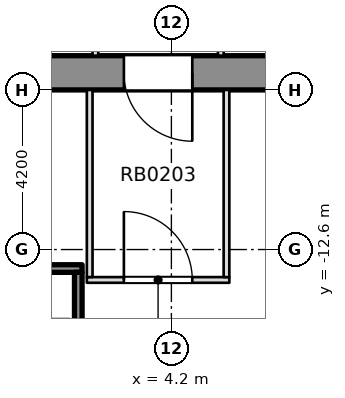
"""IFC4 building model, lengths in metres.
Left out: names, types, materials, properties, quantities, classifications, styles, units other than length and angle.
Written with IfcOpenShell. Run it as: python <this file> out.ifc"""

import sys

from ifc_helpers import new_model, si_unit, direction, frame, frame_2d, origin, place, context, subcontext, project, spatial, rectangle, extrude, element, fill, save


model = new_model("IFC4")
c1 = context("Model", 3, precision=1e-05, world=origin(), true_north=direction((0.0, 1.0)))
c2 = subcontext(c1, "Body", "Model", "MODEL_VIEW")
j1 = project(units=[si_unit("LENGTHUNIT", "METRE"), si_unit("PLANEANGLEUNIT", "RADIAN")], contexts=[c1])
p1 = place(None, origin())
s1 = spatial("IfcSite", under=j1, at=p1, CompositionType="ELEMENT")
p2 = place(p1, origin())
s2 = spatial("IfcBuilding", under=s1, at=p2, CompositionType="ELEMENT")
p3 = place(p2, frame((0.0, 0.0, -8.4)))
s3 = spatial("IfcBuildingStorey", under=s2, at=p3, CompositionType="ELEMENT", Elevation=-8.4)
p4 = place(p3, frame((-11.7, -7.95, 0.0), z_axis=(0.0, 0.0, 1.0), x_axis=(1.0, 0.0, 0.0)))
e1 = element("IfcWall", 1, at=p4, inside=s3, PredefinedType="SHEAR", context=c2, shape_type="SweptSolid", body=[
    extrude(rectangle(XDim=23.4, YDim=0.9, at=frame_2d((11.7, 0.0))), origin(), (0.0, 0.0, 1.0), 3.85),
])
p5 = place(p4, frame((6.95, 0.0, 0.0)))
e2 = element("IfcOpeningElement", 2, at=p5, cuts=e1, PredefinedType="OPENING", context=c2, shape_type="SweptSolid", body=[
    extrude(rectangle(XDim=1.8, YDim=2.1, at=frame_2d((0.9, 1.05))), frame((0.0, 0.46, 0.0), z_axis=(0.0, -1.0, 0.0), x_axis=(1.0, 0.0, 0.0)), (0.0, 0.0, 1.0), 0.92),
])
p6 = place(p4, frame((14.65, 0.0, 0.0)))
e3 = element("IfcOpeningElement", 3, at=p6, cuts=e1, PredefinedType="OPENING", context=c2, shape_type="SweptSolid", body=[
    extrude(rectangle(XDim=1.8, YDim=2.1, at=frame_2d((0.9, 1.05))), frame((0.0, 0.46, 0.0), z_axis=(0.0, -1.0, 0.0), x_axis=(1.0, 0.0, 0.0)), (0.0, 0.0, 1.0), 0.92),
])
p7 = place(p3, frame((1.975, -13.4, 0.0), z_axis=(0.0, 0.0, 1.0), x_axis=(1.0, 0.0, 0.0)))
e4 = element("IfcWall", 4, at=p7, inside=s3, PredefinedType="PARTITIONING", context=c2, shape_type="SweptSolid", body=[
    extrude(rectangle(XDim=3.75, YDim=0.15, at=frame_2d((1.875, 0.0))), origin(), (0.0, 0.0, 1.0), 3.85),
])
p8 = place(p7, frame((0.975, 0.0, 0.0)))
e5 = element("IfcOpeningElement", 5, at=p8, cuts=e4, PredefinedType="OPENING", context=c2, shape_type="SweptSolid", body=[
    extrude(rectangle(XDim=1.8, YDim=2.1, at=frame_2d((0.9, 1.05))), frame((0.0, 0.085, 0.0), z_axis=(0.0, -1.0, 0.0), x_axis=(1.0, 0.0, 0.0)), (0.0, 0.0, 1.0), 0.17),
])
for number, where, z_axis, x_axis in (
    (6, (2.05, -13.325, 0.0), (0.0, 0.0, 1.0), (0.0, 1.0, 0.0)),
    (7, (5.65, -13.325, 0.0), (0.0, 0.0, 1.0), (0.0, 1.0, 0.0)),
):
    element("IfcWall", number, at=place(p3, frame(where, z_axis=z_axis, x_axis=x_axis)), inside=s3, PredefinedType="PARTITIONING", context=c2, shape_type="SweptSolid", body=[
        extrude(rectangle(XDim=4.924, YDim=0.15, at=frame_2d((2.462, 0.0))), origin(), (0.0, 0.0, 1.0), 3.85),
    ])
p9 = place(p3, frame((2.2, -7.499, 0.0), z_axis=(0.0, 0.0, 1.0), x_axis=(0.0, 1.0, 0.0)))
e8 = element("IfcWall", 8, at=p9, inside=s3, PredefinedType="PARTITIONING", context=c2, shape_type="SweptSolid", body=[
    extrude(rectangle(XDim=11.924, YDim=0.15, at=frame_2d((5.962, 0.0))), origin(), (0.0, 0.0, 1.0), 3.85),
])
p10 = place(p9, frame((0.949, 0.0, 0.0)))
e9 = element("IfcOpeningElement", 9, at=p10, cuts=e8, PredefinedType="OPENING", context=c2, shape_type="SweptSolid", body=[
    extrude(rectangle(XDim=1.1, YDim=2.1, at=frame_2d((0.55, 1.05))), frame((0.0, 0.085, 0.0), z_axis=(0.0, -1.0, 0.0), x_axis=(1.0, 0.0, 0.0)), (0.0, 0.0, 1.0), 0.17),
])
p11 = place(p9, frame((3.949, 0.0, 0.0)))
e10 = element("IfcOpeningElement", 10, at=p11, cuts=e8, PredefinedType="OPENING", context=c2, shape_type="SweptSolid", body=[
    extrude(rectangle(XDim=1.1, YDim=2.1, at=frame_2d((0.55, 1.05))), frame((0.0, 0.085, 0.0), z_axis=(0.0, -1.0, 0.0), x_axis=(1.0, 0.0, 0.0)), (0.0, 0.0, 1.0), 0.17),
])
p12 = place(p9, frame((6.949, 0.0, 0.0)))
e11 = element("IfcOpeningElement", 11, at=p12, cuts=e8, PredefinedType="OPENING", context=c2, shape_type="SweptSolid", body=[
    extrude(rectangle(XDim=1.1, YDim=2.1, at=frame_2d((0.55, 1.05))), frame((0.0, 0.085, 0.0), z_axis=(0.0, -1.0, 0.0), x_axis=(1.0, 0.0, 0.0)), (0.0, 0.0, 1.0), 0.17),
])
p13 = place(p9, frame((9.949, 0.0, 0.0)))
e12 = element("IfcOpeningElement", 12, at=p13, cuts=e8, PredefinedType="OPENING", context=c2, shape_type="SweptSolid", body=[
    extrude(rectangle(XDim=1.1, YDim=2.1, at=frame_2d((0.55, 1.05))), frame((0.0, 0.085, 0.0), z_axis=(0.0, -1.0, 0.0), x_axis=(1.0, 0.0, 0.0)), (0.0, 0.0, 1.0), 0.17),
])
p14 = place(p3, frame((5.5, -7.499, 0.0), z_axis=(0.0, 0.0, 1.0), x_axis=(0.0, 1.0, 0.0)))
e13 = element("IfcWall", 13, at=p14, inside=s3, PredefinedType="PARTITIONING", context=c2, shape_type="SweptSolid", body=[
    extrude(rectangle(XDim=11.924, YDim=0.15, at=frame_2d((5.962, 0.0))), origin(), (0.0, 0.0, 1.0), 3.85),
])
p15 = place(p14, frame((0.949, 0.0, 0.0)))
e14 = element("IfcOpeningElement", 14, at=p15, cuts=e13, PredefinedType="OPENING", context=c2, shape_type="SweptSolid", body=[
    extrude(rectangle(XDim=1.1, YDim=2.1, at=frame_2d((0.55, 1.05))), frame((0.0, 0.085, 0.0), z_axis=(0.0, -1.0, 0.0), x_axis=(1.0, 0.0, 0.0)), (0.0, 0.0, 1.0), 0.17),
])
p16 = place(p14, frame((3.949, 0.0, 0.0)))
e15 = element("IfcOpeningElement", 15, at=p16, cuts=e13, PredefinedType="OPENING", context=c2, shape_type="SweptSolid", body=[
    extrude(rectangle(XDim=1.1, YDim=2.1, at=frame_2d((0.55, 1.05))), frame((0.0, 0.085, 0.0), z_axis=(0.0, -1.0, 0.0), x_axis=(1.0, 0.0, 0.0)), (0.0, 0.0, 1.0), 0.17),
])
p17 = place(p14, frame((6.949, 0.0, 0.0)))
e16 = element("IfcOpeningElement", 16, at=p17, cuts=e13, PredefinedType="OPENING", context=c2, shape_type="SweptSolid", body=[
    extrude(rectangle(XDim=1.1, YDim=2.1, at=frame_2d((0.55, 1.05))), frame((0.0, 0.085, 0.0), z_axis=(0.0, -1.0, 0.0), x_axis=(1.0, 0.0, 0.0)), (0.0, 0.0, 1.0), 0.17),
])
p18 = place(p14, frame((9.949, 0.0, 0.0)))
e17 = element("IfcOpeningElement", 17, at=p18, cuts=e13, PredefinedType="OPENING", context=c2, shape_type="SweptSolid", body=[
    extrude(rectangle(XDim=1.1, YDim=2.1, at=frame_2d((0.55, 1.05))), frame((0.0, 0.085, 0.0), z_axis=(0.0, -1.0, 0.0), x_axis=(1.0, 0.0, 0.0)), (0.0, 0.0, 1.0), 0.17),
])
p19 = place(p3, frame((-1.85, -13.1, 0.0), z_axis=(0.0, 0.0, 1.0), x_axis=(1.0, 0.0, 0.0)))
e18 = element("IfcWall", 18, at=p19, inside=s3, PredefinedType="SOLIDWALL", context=c2, shape_type="SweptSolid", body=[
    extrude(rectangle(XDim=3.7, YDim=0.2, at=frame_2d((1.85, 0.0))), origin(), (0.0, 0.0, 1.0), 3.85),
])
p20 = place(p3, frame((1.75, -19.8, 0.0), z_axis=(0.0, 0.0, 1.0), x_axis=(0.0, 1.0, 0.0)))
e19 = element("IfcWall", 19, at=p20, inside=s3, PredefinedType="SOLIDWALL", context=c2, shape_type="SweptSolid", body=[
    extrude(rectangle(XDim=6.6, YDim=0.2, at=frame_2d((3.3, 0.0))), origin(), (0.0, 0.0, 1.0), 3.85),
])
p21 = place(p8, origin())
e20 = element("IfcDoor", 20, at=p21, inside=s3, OperationType="DOUBLE_DOOR_SINGLE_SWING", PredefinedType="DOOR", context=c2, shape_type="SweptSolid", body=[
    extrude(rectangle(XDim=1.8, YDim=2.1, at=frame_2d((0.9, 1.05))), frame((0.0, 0.025, 0.0), z_axis=(0.0, -1.0, 0.0), x_axis=(1.0, 0.0, 0.0)), (0.0, 0.0, 1.0), 0.05),
])
fill(e5, e20)
p22 = place(p6, origin())
e21 = element("IfcDoor", 21, at=p22, inside=s3, OperationType="SINGLE_SWING_LEFT", PredefinedType="DOOR", context=c2, shape_type="SweptSolid", body=[
    extrude(rectangle(XDim=1.8, YDim=2.1, at=frame_2d((0.9, 1.05))), frame((0.0, 0.025, 0.0), z_axis=(0.0, -1.0, 0.0), x_axis=(1.0, 0.0, 0.0)), (0.0, 0.0, 1.0), 0.05),
])
fill(e3, e21)
save(model, sys.argv[1])
